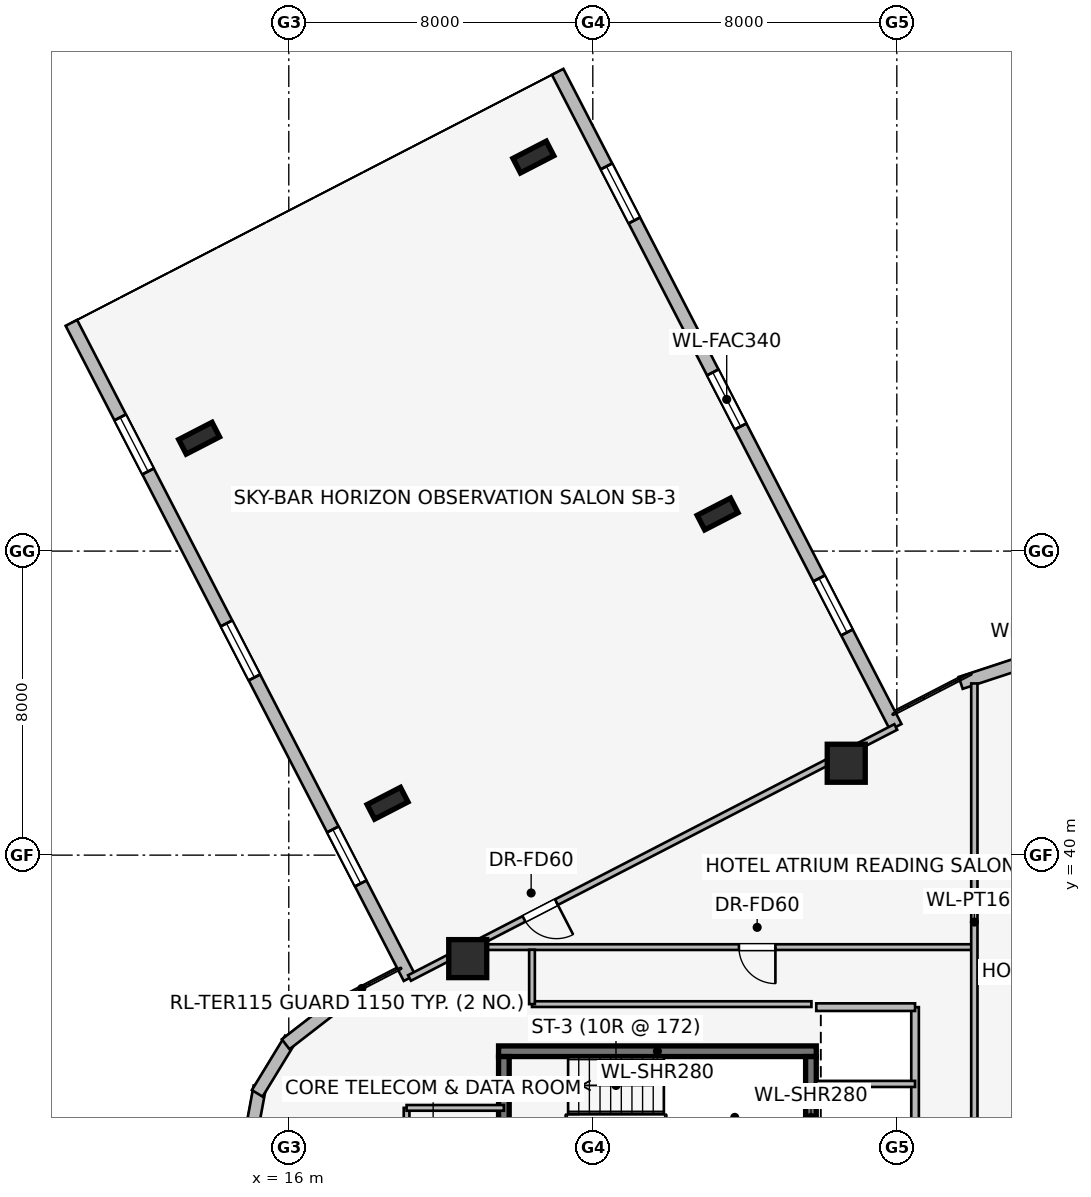
"""IFC4 building model, lengths in metres.
Left out: names, types, materials, properties, quantities, classifications, styles, units other than length and angle.
Written with IfcOpenShell. Run it as: python <this file> out.ifc"""

import sys

from ifc_helpers import new_model, si_unit, direction, frame, frame_2d, origin, origin_2d, place, context, subcontext, project, spatial, rectangle, i_section, extrude, element, fill, save


model = new_model("IFC4")
c1 = context("Model", 3, precision=1e-05, world=origin(), true_north=direction((0.0, 1.0)))
c2 = subcontext(c1, "Body", "Model", "MODEL_VIEW")
j1 = project(units=[si_unit("LENGTHUNIT", "METRE"), si_unit("PLANEANGLEUNIT", "RADIAN")], contexts=[c1])
p1 = place(None, origin())
s1 = spatial("IfcSite", under=j1, at=p1, CompositionType="ELEMENT")
p2 = place(p1, origin())
s2 = spatial("IfcBuilding", under=s1, at=p2, CompositionType="ELEMENT")
p3 = place(p2, frame((0.0, 0.0, 142.95)))
s3 = spatial("IfcBuildingStorey", under=s2, at=p3, CompositionType="ELEMENT", Elevation=142.95)
p4 = place(p3, frame((29.88, 34.84, 0.0), z_axis=(0.0, 0.0, 1.0), x_axis=(-1.0, 0.0, 0.0)))
e1 = element("IfcWall", 1, at=p4, inside=s3, PredefinedType="SHEAR", context=c2, shape_type="SweptSolid", body=[
    extrude(rectangle(XDim=8.36, YDim=0.28, at=frame_2d((4.18, 0.0))), origin(), (0.0, 0.0, 1.0), 3.45),
])
for number, where, z_axis, x_axis in (
    (2, (21.66, 34.7, 0.0), (0.0, 0.0, 1.0), (0.0, -1.0, 0.0)),
    (3, (29.74, 31.5, 0.0), (0.0, 0.0, 1.0), (0.0, 1.0, 0.0)),
):
    element("IfcWall", number, at=place(p3, frame(where, z_axis=z_axis, x_axis=x_axis)), inside=s3, PredefinedType="SHEAR", context=c2, shape_type="SweptSolid", body=[
        extrude(rectangle(XDim=3.2, YDim=0.28, at=frame_2d((1.6, 0.0))), origin(), (0.0, 0.0, 1.0), 3.45),
    ])
for number, where, z_axis, x_axis in (
    (4, (30.669, 42.418, 0.0), (0.0, 0.0, 1.0), (1.0, 0.0, 0.0)),
    (5, (20.709, 37.277, 0.0), (0.0, 0.0, 1.0), (1.0, 0.0, 0.0)),
):
    element("IfcColumn", number, at=place(p3, frame(where, z_axis=z_axis, x_axis=x_axis)), inside=s3, PredefinedType="COLUMN", context=c2, shape_type="SweptSolid", body=[
        extrude(rectangle(XDim=1.0, YDim=1.0, at=origin_2d()), origin(), (0.0, 0.0, 1.0), 3.45),
    ])
for number, where, z_axis, x_axis in (
    (6, (27.284, 48.976, 0.0), (0.0, 0.0, 1.0), (-0.459, 0.889, 0.0)),
    (7, (18.599, 41.365, 0.0), (0.0, 0.0, 1.0), (-0.459, 0.889, 0.0)),
    (8, (22.436, 58.368, 0.0), (0.0, 0.0, 1.0), (-0.459, 0.889, 0.0)),
    (9, (13.641, 50.97, 0.0), (0.0, 0.0, 1.0), (-0.459, 0.889, 0.0)),
):
    element("IfcColumn", number, at=place(p3, frame(where, z_axis=z_axis, x_axis=x_axis)), inside=s3, PredefinedType="COLUMN", context=c2, shape_type="SweptSolid", body=[
        extrude(i_section(OverallWidth=0.431, OverallDepth=0.987, WebThickness=0.034, FlangeThickness=0.062, at=origin_2d()), origin(), (0.0, 0.0, 1.0), 3.45),
    ])
p5 = place(p3, frame((33.681, 44.532, 0.0), z_axis=(0.0, 0.0, 1.0), x_axis=(0.949937416267, 0.312440242569, 0.0)))
e10 = element("IfcWall", 10, at=p5, inside=s3, PredefinedType="STANDARD", context=c2, shape_type="SweptSolid", body=[
    extrude(rectangle(XDim=1.722, YDim=0.33, at=frame_2d((0.861, 0.0))), origin(), (0.0, 0.0, 1.0), 3.16),
])
p6 = place(p3, frame((23.075, 60.611, 0.0), z_axis=(0.0, 0.0, 1.0), x_axis=(0.458619197522, -0.888632900395, 0.0)))
e11 = element("IfcWall", 11, at=p6, inside=s3, PredefinedType="STANDARD", context=c2, shape_type="SweptSolid", body=[
    extrude(rectangle(XDim=19.399, YDim=0.34, at=frame_2d((9.7, 0.0))), origin(), (0.0, 0.0, 1.0), 3.16),
])
p7 = place(p6, frame((2.8, 0.0, 0.75)))
e12 = element("IfcOpeningElement", 12, at=p7, cuts=e11, PredefinedType="OPENING", context=c2, shape_type="SweptSolid", body=[
    extrude(rectangle(XDim=1.6, YDim=1.55, at=frame_2d((0.8, 0.775))), frame((0.0, 0.18, 0.0), z_axis=(0.0, -1.0, 0.0), x_axis=(1.0, 0.0, 0.0)), (0.0, 0.0, 1.0), 0.36),
])
p8 = place(p6, frame((8.9, 0.0, 0.75)))
e13 = element("IfcOpeningElement", 13, at=p8, cuts=e11, PredefinedType="OPENING", context=c2, shape_type="SweptSolid", body=[
    extrude(rectangle(XDim=1.6, YDim=1.55, at=frame_2d((0.8, 0.775))), frame((0.0, 0.18, 0.0), z_axis=(0.0, -1.0, 0.0), x_axis=(1.0, 0.0, 0.0)), (0.0, 0.0, 1.0), 0.36),
])
p9 = place(p6, frame((15.0, 0.0, 0.75)))
e14 = element("IfcOpeningElement", 14, at=p9, cuts=e11, PredefinedType="OPENING", context=c2, shape_type="SweptSolid", body=[
    extrude(rectangle(XDim=1.6, YDim=1.55, at=frame_2d((0.8, 0.775))), frame((0.0, 0.18, 0.0), z_axis=(0.0, -1.0, 0.0), x_axis=(1.0, 0.0, 0.0)), (0.0, 0.0, 1.0), 0.36),
])
p10 = place(p3, frame((19.177, 36.767, 0.0), z_axis=(0.0, 0.0, 1.0), x_axis=(-0.458658947762, 0.88861238436, 0.0)))
e15 = element("IfcWall", 15, at=p10, inside=s3, PredefinedType="STANDARD", context=c2, shape_type="SweptSolid", body=[
    extrude(rectangle(XDim=19.4, YDim=0.34, at=frame_2d((9.7, 0.0))), origin(), (0.0, 0.0, 1.0), 3.16),
])
p11 = place(p10, frame((2.8, 0.0, 0.75)))
e16 = element("IfcOpeningElement", 16, at=p11, cuts=e15, PredefinedType="OPENING", context=c2, shape_type="SweptSolid", body=[
    extrude(rectangle(XDim=1.6, YDim=1.55, at=frame_2d((0.8, 0.775))), frame((0.0, 0.18, 0.0), z_axis=(0.0, -1.0, 0.0), x_axis=(1.0, 0.0, 0.0)), (0.0, 0.0, 1.0), 0.36),
])
p12 = place(p10, frame((8.9, 0.0, 0.75)))
e17 = element("IfcOpeningElement", 17, at=p12, cuts=e15, PredefinedType="OPENING", context=c2, shape_type="SweptSolid", body=[
    extrude(rectangle(XDim=1.6, YDim=1.55, at=frame_2d((0.8, 0.775))), frame((0.0, 0.18, 0.0), z_axis=(0.0, -1.0, 0.0), x_axis=(1.0, 0.0, 0.0)), (0.0, 0.0, 1.0), 0.36),
])
p13 = place(p10, frame((15.0, 0.0, 0.75)))
e18 = element("IfcOpeningElement", 18, at=p13, cuts=e15, PredefinedType="OPENING", context=c2, shape_type="SweptSolid", body=[
    extrude(rectangle(XDim=1.6, YDim=1.55, at=frame_2d((0.8, 0.775))), frame((0.0, 0.18, 0.0), z_axis=(0.0, -1.0, 0.0), x_axis=(1.0, 0.0, 0.0)), (0.0, 0.0, 1.0), 0.36),
])
p14 = place(p3, frame((14.932, 32.258, 0.0), z_axis=(0.0, 0.0, 1.0), x_axis=(0.181984991895, 0.983301308209, 0.0)))
e19 = element("IfcWall", 19, at=p14, inside=s3, PredefinedType="STANDARD", context=c2, shape_type="SweptSolid", body=[
    extrude(rectangle(XDim=1.677, YDim=0.33, at=frame_2d((0.838, 0.0))), origin(), (0.0, 0.0, 1.0), 3.16),
])
p15 = place(p3, frame((15.17, 33.732, 0.0), z_axis=(0.0, 0.0, 1.0), x_axis=(0.520519429557, 0.853849824883, 0.0)))
e20 = element("IfcWall", 20, at=p15, inside=s3, PredefinedType="STANDARD", context=c2, shape_type="SweptSolid", body=[
    extrude(rectangle(XDim=1.677, YDim=0.33, at=frame_2d((0.839, 0.0))), origin(), (0.0, 0.0, 1.0), 3.16),
])
p16 = place(p3, frame((15.918, 35.024, 0.0), z_axis=(0.0, 0.0, 1.0), x_axis=(0.790621329885, 0.612305408053, 0.0)))
e21 = element("IfcWall", 21, at=p16, inside=s3, PredefinedType="STANDARD", context=c2, shape_type="SweptSolid", body=[
    extrude(rectangle(XDim=1.676, YDim=0.33, at=frame_2d((0.838, 0.0))), origin(), (0.0, 0.0, 1.0), 3.16),
])
p17 = place(p3, frame((32.48, 31.95, 0.0), z_axis=(0.0, 0.0, 1.0), x_axis=(0.0, 1.0, 0.0)))
e22 = element("IfcWall", 22, at=p17, inside=s3, PredefinedType="PARTITIONING", context=c2, shape_type="SweptSolid", body=[
    extrude(rectangle(XDim=4.05, YDim=0.2, at=frame_2d((2.025, 0.0))), origin(), (0.0, 0.0, 1.0), 3.16),
])
p18 = place(p3, frame((29.88, 36.0, 0.0), z_axis=(0.0, 0.0, 1.0), x_axis=(1.0, 0.0, 0.0)))
e23 = element("IfcWall", 23, at=p18, inside=s3, PredefinedType="PARTITIONING", context=c2, shape_type="SweptSolid", body=[
    extrude(rectangle(XDim=2.6, YDim=0.2, at=frame_2d((1.3, 0.0))), origin(), (0.0, 0.0, 1.0), 2.552),
])
p19 = place(p3, frame((29.875, 33.98, 0.0), z_axis=(0.0, 0.0, 1.0), x_axis=(1.0, 0.0, 0.0)))
e24 = element("IfcWall", 24, at=p19, inside=s3, PredefinedType="PARTITIONING", context=c2, shape_type="SweptSolid", body=[
    extrude(rectangle(XDim=2.605, YDim=0.16, at=frame_2d((1.302, 0.0))), origin(), (0.0, 0.0, 1.0), 3.16),
])
p20 = place(p3, frame((19.1, 33.35, 0.0), z_axis=(0.0, 0.0, 1.0), x_axis=(0.0, -1.0, 0.0)))
e25 = element("IfcWall", 25, at=p20, inside=s3, PredefinedType="PARTITIONING", context=c2, shape_type="SweptSolid", body=[
    extrude(rectangle(XDim=2.655, YDim=0.15, at=frame_2d((1.328, 0.0))), origin(), (0.0, 0.0, 1.0), 2.39),
])
p21 = place(p3, frame((21.66, 33.35, 0.0), z_axis=(0.0, 0.0, 1.0), x_axis=(-1.0, 0.0, 0.0)))
e26 = element("IfcWall", 26, at=p21, inside=s3, PredefinedType="PARTITIONING", context=c2, shape_type="SweptSolid", body=[
    extrude(rectangle(XDim=2.56, YDim=0.15, at=frame_2d((1.28, 0.0))), origin(), (0.0, 0.0, 1.0), 3.16),
])
p22 = place(p3, frame((34.0, 37.58, 0.0), z_axis=(0.0, 0.0, 1.0), x_axis=(-1.0, 0.0, 0.0)))
e27 = element("IfcWall", 27, at=p22, inside=s3, PredefinedType="PARTITIONING", context=c2, shape_type="SweptSolid", body=[
    extrude(rectangle(XDim=13.707, YDim=0.15, at=frame_2d((6.854, 0.0))), origin(), (0.0, 0.0, 1.0), 2.627),
])
p23 = place(p22, frame((5.195, 0.0, 0.0)))
e28 = element("IfcOpeningElement", 28, at=p23, cuts=e27, PredefinedType="OPENING", context=c2, shape_type="SweptSolid", body=[
    extrude(rectangle(XDim=0.96, YDim=2.0, at=frame_2d((0.48, 1.0))), frame((0.0, 0.085, 0.0), z_axis=(0.0, -1.0, 0.0), x_axis=(1.0, 0.0, 0.0)), (0.0, 0.0, 1.0), 0.17),
])
p24 = place(p3, frame((34.04, 31.96, 0.0), z_axis=(0.0, 0.0, 1.0), x_axis=(0.0, 1.0, 0.0)))
e29 = element("IfcWall", 29, at=p24, inside=s3, PredefinedType="PARTITIONING", context=c2, shape_type="SweptSolid", body=[
    extrude(rectangle(XDim=12.558, YDim=0.165, at=frame_2d((6.279, 0.0))), origin(), (0.0, 0.0, 1.0), 3.16),
])
p25 = place(p3, frame((31.972, 43.372, 0.0), z_axis=(0.0, 0.0, 1.0), x_axis=(-0.888588109751, -0.458705974683, 0.0)))
e30 = element("IfcWall", 30, at=p25, inside=s3, PredefinedType="PARTITIONING", context=c2, shape_type="SweptSolid", body=[
    extrude(rectangle(XDim=14.399, YDim=0.165, at=frame_2d((7.2, 0.0))), origin(), (0.0, 0.0, 1.0), 2.532),
])
p26 = place(p25, frame((10.049, 0.0, 0.0)))
e31 = element("IfcOpeningElement", 31, at=p26, cuts=e30, PredefinedType="OPENING", context=c2, shape_type="SweptSolid", body=[
    extrude(rectangle(XDim=0.96, YDim=2.0, at=frame_2d((0.48, 1.0))), frame((0.0, 0.093, 0.0), z_axis=(0.0, -1.0, 0.0), x_axis=(1.0, 0.0, 0.0)), (0.0, 0.0, 1.0), 0.185),
])
p27 = place(p3, frame((29.753, 36.08, 0.0), z_axis=(0.0, 0.0, 1.0), x_axis=(-1.0, 0.0, 0.0)))
e32 = element("IfcWall", 32, at=p27, inside=s3, PredefinedType="PARTITIONING", context=c2, shape_type="SweptSolid", body=[
    extrude(rectangle(XDim=7.353, YDim=0.15, at=frame_2d((3.677, 0.0))), origin(), (0.0, 0.0, 1.0), 2.627),
])
p28 = place(p3, frame((22.4, 36.08, 0.0), z_axis=(0.0, 0.0, 1.0), x_axis=(0.0, 1.0, 0.0)))
e33 = element("IfcWall", 33, at=p28, inside=s3, PredefinedType="PARTITIONING", context=c2, shape_type="SweptSolid", body=[
    extrude(rectangle(XDim=1.43, YDim=0.15, at=frame_2d((0.715, 0.0))), origin(), (0.0, 0.0, 1.0), 3.16),
])
p29 = place(p7, origin())
e34 = element("IfcWindow", 34, at=p29, inside=s3, PartitioningType="SINGLE_PANEL", PredefinedType="WINDOW", context=c2, shape_type="SweptSolid", body=[
    extrude(rectangle(XDim=1.6, YDim=1.55, at=frame_2d((0.8, 0.775))), frame((0.0, 0.03, 0.0), z_axis=(0.0, -1.0, 0.0), x_axis=(1.0, 0.0, 0.0)), (0.0, 0.0, 1.0), 0.06),
])
fill(e12, e34)
p30 = place(p8, origin())
e35 = element("IfcWindow", 35, at=p30, inside=s3, PartitioningType="SINGLE_PANEL", PredefinedType="WINDOW", context=c2, shape_type="SweptSolid", body=[
    extrude(rectangle(XDim=1.6, YDim=1.55, at=frame_2d((0.8, 0.775))), frame((0.0, 0.03, 0.0), z_axis=(0.0, -1.0, 0.0), x_axis=(1.0, 0.0, 0.0)), (0.0, 0.0, 1.0), 0.06),
])
fill(e13, e35)
p31 = place(p9, origin())
e36 = element("IfcWindow", 36, at=p31, inside=s3, PartitioningType="SINGLE_PANEL", PredefinedType="WINDOW", context=c2, shape_type="SweptSolid", body=[
    extrude(rectangle(XDim=1.6, YDim=1.55, at=frame_2d((0.8, 0.775))), frame((0.0, 0.03, 0.0), z_axis=(0.0, -1.0, 0.0), x_axis=(1.0, 0.0, 0.0)), (0.0, 0.0, 1.0), 0.06),
])
fill(e14, e36)
p32 = place(p11, origin())
e37 = element("IfcWindow", 37, at=p32, inside=s3, PartitioningType="SINGLE_PANEL", PredefinedType="WINDOW", context=c2, shape_type="SweptSolid", body=[
    extrude(rectangle(XDim=1.6, YDim=1.55, at=frame_2d((0.8, 0.775))), frame((0.0, 0.03, 0.0), z_axis=(0.0, -1.0, 0.0), x_axis=(1.0, 0.0, 0.0)), (0.0, 0.0, 1.0), 0.06),
])
fill(e16, e37)
p33 = place(p12, origin())
e38 = element("IfcWindow", 38, at=p33, inside=s3, PartitioningType="SINGLE_PANEL", PredefinedType="WINDOW", context=c2, shape_type="SweptSolid", body=[
    extrude(rectangle(XDim=1.6, YDim=1.55, at=frame_2d((0.8, 0.775))), frame((0.0, 0.03, 0.0), z_axis=(0.0, -1.0, 0.0), x_axis=(1.0, 0.0, 0.0)), (0.0, 0.0, 1.0), 0.06),
])
fill(e17, e38)
p34 = place(p13, origin())
e39 = element("IfcWindow", 39, at=p34, inside=s3, PartitioningType="SINGLE_PANEL", PredefinedType="WINDOW", context=c2, shape_type="SweptSolid", body=[
    extrude(rectangle(XDim=1.6, YDim=1.55, at=frame_2d((0.8, 0.775))), frame((0.0, 0.03, 0.0), z_axis=(0.0, -1.0, 0.0), x_axis=(1.0, 0.0, 0.0)), (0.0, 0.0, 1.0), 0.06),
])
fill(e18, e39)
p35 = place(p23, origin())
e40 = element("IfcDoor", 40, at=p35, inside=s3, OperationType="SINGLE_SWING_LEFT", PredefinedType="DOOR", context=c2, shape_type="SweptSolid", body=[
    extrude(rectangle(XDim=0.96, YDim=2.0, at=frame_2d((0.48, 1.0))), frame((0.0, 0.025, 0.0), z_axis=(0.0, -1.0, 0.0), x_axis=(1.0, 0.0, 0.0)), (0.0, 0.0, 1.0), 0.05),
])
fill(e28, e40)
p36 = place(p26, origin())
e41 = element("IfcDoor", 41, at=p36, inside=s3, OperationType="SINGLE_SWING_LEFT", PredefinedType="DOOR", context=c2, shape_type="SweptSolid", body=[
    extrude(rectangle(XDim=0.96, YDim=2.0, at=frame_2d((0.48, 1.0))), frame((0.0, 0.025, 0.0), z_axis=(0.0, -1.0, 0.0), x_axis=(1.0, 0.0, 0.0)), (0.0, 0.0, 1.0), 0.05),
])
fill(e31, e41)
save(model, sys.argv[1])
